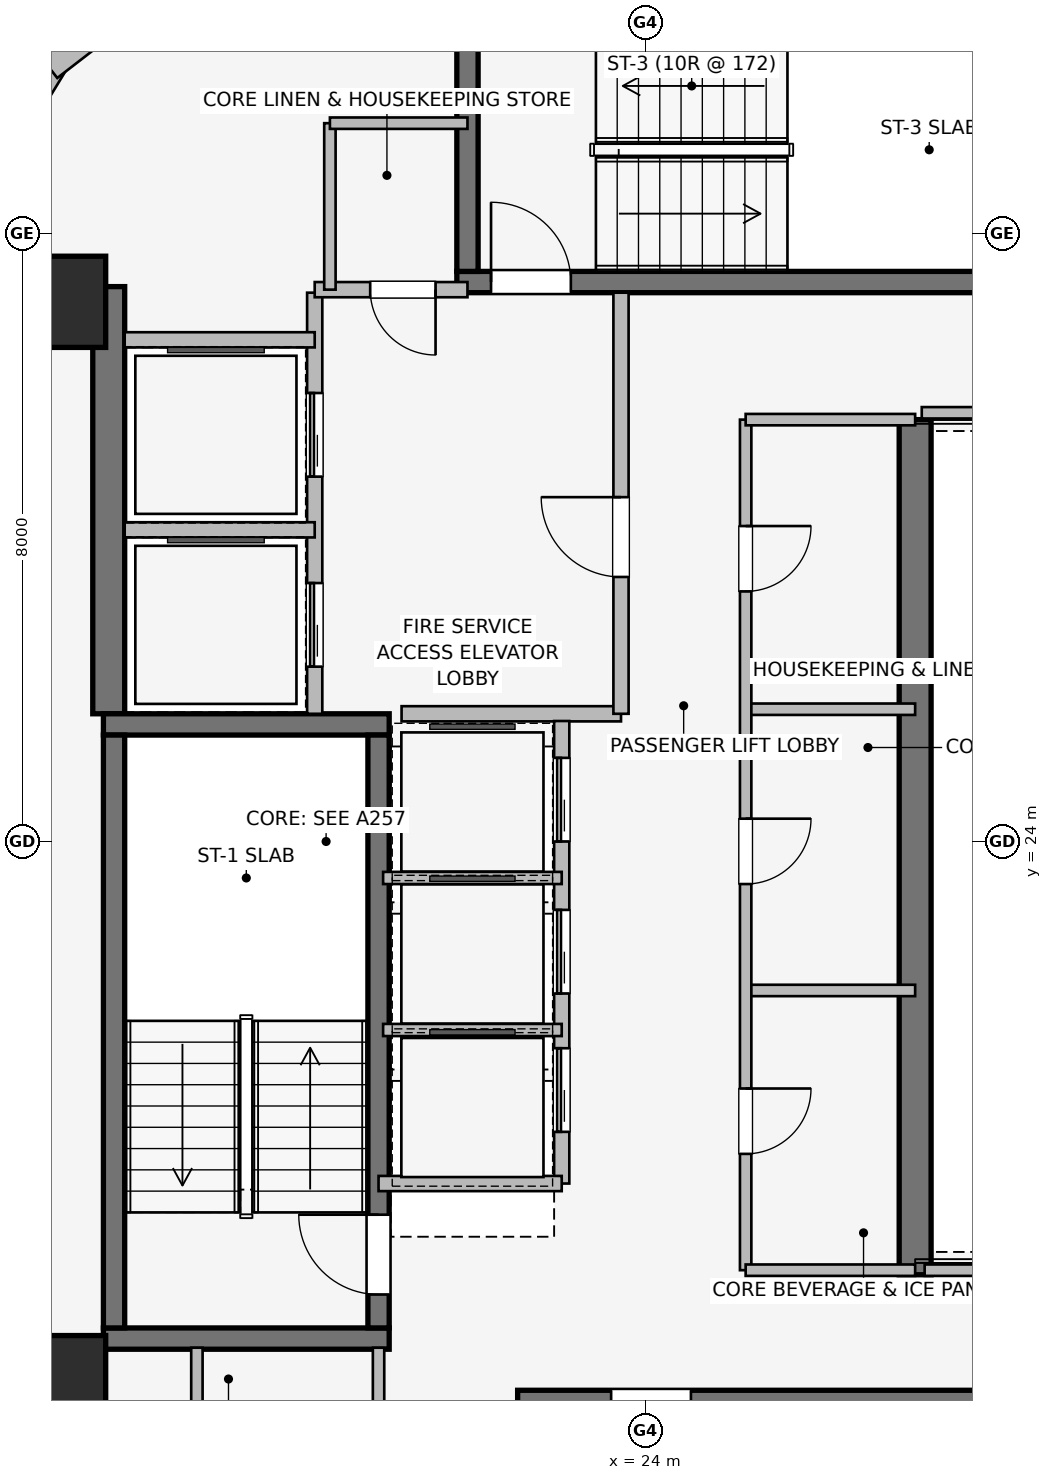
"""IFC4 building model, lengths in metres.
Left out: names, types, materials, properties, quantities, classifications, styles, units other than length and angle.
Written with IfcOpenShell. Run it as: python <this file> out.ifc"""

import sys

from ifc_helpers import new_model, si_unit, direction, frame, frame_2d, origin, origin_2d, place, context, subcontext, project, spatial, rectangle, extrude, element, fill, save


model = new_model("IFC4")
c1 = context("Model", 3, precision=1e-05, world=origin(), true_north=direction((0.0, 1.0)))
c2 = subcontext(c1, "Body", "Model", "MODEL_VIEW")
j1 = project(units=[si_unit("LENGTHUNIT", "METRE"), si_unit("PLANEANGLEUNIT", "RADIAN")], contexts=[c1])
p1 = place(None, origin())
s1 = spatial("IfcSite", under=j1, at=p1, CompositionType="ELEMENT")
p2 = place(p1, origin())
s2 = spatial("IfcBuilding", under=s1, at=p2, CompositionType="ELEMENT")
p3 = place(p2, frame((0.0, 0.0, 203.35)))
s3 = spatial("IfcBuildingStorey", under=s2, at=p3, CompositionType="ELEMENT", Elevation=203.35)
p4 = place(p3, frame((16.94, 25.68, 0.0), z_axis=(0.0, 0.0, 1.0), x_axis=(0.0, 1.0, 0.0)))
e1 = element("IfcWall", 1, at=p4, inside=s3, PredefinedType="SHEAR", context=c2, shape_type="SweptSolid", body=[
    extrude(rectangle(XDim=5.62, YDim=0.42, at=frame_2d((2.81, 0.0))), origin(), (0.0, 0.0, 1.0), 3.45),
])
p5 = place(p3, frame((27.55, 29.55, 0.0), z_axis=(0.0, 0.0, 1.0), x_axis=(0.0, -1.0, 0.0)))
e2 = element("IfcWall", 2, at=p5, inside=s3, PredefinedType="SHEAR", context=c2, shape_type="SweptSolid", body=[
    extrude(rectangle(XDim=11.25, YDim=0.42, at=frame_2d((5.625, 0.0))), origin(), (0.0, 0.0, 1.0), 3.45),
])
for number, where, z_axis, x_axis in (
    (3, (16.87, 17.46, 0.0), (0.0, 0.0, 1.0), (1.0, 0.0, 0.0)),
    (4, (20.63, 25.54, 0.0), (0.0, 0.0, 1.0), (-1.0, 0.0, 0.0)),
):
    element("IfcWall", number, at=place(p3, frame(where, z_axis=z_axis, x_axis=x_axis)), inside=s3, PredefinedType="SHEAR", context=c2, shape_type="SweptSolid", body=[
        extrude(rectangle(XDim=3.76, YDim=0.28, at=frame_2d((1.88, 0.0))), origin(), (0.0, 0.0, 1.0), 3.45),
    ])
p6 = place(p3, frame((17.01, 25.4, 0.0), z_axis=(0.0, 0.0, 1.0), x_axis=(0.0, -1.0, 0.0)))
e5 = element("IfcWall", 5, at=p6, inside=s3, PredefinedType="SHEAR", context=c2, shape_type="SweptSolid", body=[
    extrude(rectangle(XDim=7.8, YDim=0.28, at=frame_2d((3.9, 0.0))), origin(), (0.0, 0.0, 1.0), 3.45),
])
p7 = place(p3, frame((20.49, 17.6, 0.0), z_axis=(0.0, 0.0, 1.0), x_axis=(0.0, 1.0, 0.0)))
e6 = element("IfcWall", 6, at=p7, inside=s3, PredefinedType="SHEAR", context=c2, shape_type="SweptSolid", body=[
    extrude(rectangle(XDim=7.8, YDim=0.28, at=frame_2d((3.9, 0.0))), origin(), (0.0, 0.0, 1.0), 3.45),
])
p8 = place(p7, frame((0.44, 0.0, 0.0)))
e7 = element("IfcOpeningElement", 7, at=p8, cuts=e6, PredefinedType="OPENING", context=c2, shape_type="SweptSolid", body=[
    extrude(rectangle(XDim=1.05, YDim=2.0, at=frame_2d((0.525, 1.0))), frame((0.0, 0.15, 0.0), z_axis=(0.0, -1.0, 0.0), x_axis=(1.0, 0.0, 0.0)), (0.0, 0.0, 1.0), 0.3),
])
p9 = place(p3, frame((30.68, 16.64, 0.0), z_axis=(0.0, 0.0, 1.0), x_axis=(-1.0, 0.0, 0.0)))
e8 = element("IfcWall", 8, at=p9, inside=s3, PredefinedType="SHEAR", context=c2, shape_type="SweptSolid", body=[
    extrude(rectangle(XDim=8.36, YDim=0.28, at=frame_2d((4.18, 0.0))), origin(), (0.0, 0.0, 1.0), 3.45),
])
p10 = place(p9, frame((6.08, 0.0, 0.0)))
e9 = element("IfcOpeningElement", 9, at=p10, cuts=e8, PredefinedType="OPENING", context=c2, shape_type="SweptSolid", body=[
    extrude(rectangle(XDim=1.05, YDim=2.0, at=frame_2d((0.525, 1.0))), frame((0.0, 0.15, 0.0), z_axis=(0.0, -1.0, 0.0), x_axis=(1.0, 0.0, 0.0)), (0.0, 0.0, 1.0), 0.3),
])
p11 = place(p3, frame((21.52, 31.36, 0.0), z_axis=(0.0, 0.0, 1.0), x_axis=(1.0, 0.0, 0.0)))
e10 = element("IfcWall", 10, at=p11, inside=s3, PredefinedType="SHEAR", context=c2, shape_type="SweptSolid", body=[
    extrude(rectangle(XDim=8.36, YDim=0.28, at=frame_2d((4.18, 0.0))), origin(), (0.0, 0.0, 1.0), 3.45),
])
p12 = place(p11, frame((0.45, 0.0, 0.0)))
e11 = element("IfcOpeningElement", 11, at=p12, cuts=e10, PredefinedType="OPENING", context=c2, shape_type="SweptSolid", body=[
    extrude(rectangle(XDim=1.05, YDim=2.0, at=frame_2d((0.525, 1.0))), frame((0.0, 0.15, 0.0), z_axis=(0.0, -1.0, 0.0), x_axis=(1.0, 0.0, 0.0)), (0.0, 0.0, 1.0), 0.3),
])
p13 = place(p3, frame((21.66, 34.7, 0.0), z_axis=(0.0, 0.0, 1.0), x_axis=(0.0, -1.0, 0.0)))
e12 = element("IfcWall", 12, at=p13, inside=s3, PredefinedType="SHEAR", context=c2, shape_type="SweptSolid", body=[
    extrude(rectangle(XDim=3.2, YDim=0.28, at=frame_2d((1.6, 0.0))), origin(), (0.0, 0.0, 1.0), 3.45),
])
for number, where, z_axis, x_axis in (
    (13, (16.3, 16.9, 0.0), (0.0, 0.0, 1.0), (1.0, 0.0, 0.0)),
    (14, (16.3, 31.1, 0.0), (0.0, 0.0, 1.0), (1.0, 0.0, 0.0)),
):
    element("IfcColumn", number, at=place(p3, frame(where, z_axis=z_axis, x_axis=x_axis)), inside=s3, PredefinedType="COLUMN", context=c2, shape_type="SweptSolid", body=[
        extrude(rectangle(XDim=1.2, YDim=1.2, at=origin_2d()), origin(), (0.0, 0.0, 1.0), 3.45),
    ])
p14 = place(p3, frame((15.415, 32.882, 0.0), z_axis=(0.0, 0.0, 1.0), x_axis=(0.520325409202, 0.853968072318, 0.0)))
e15 = element("IfcWall", 15, at=p14, inside=s3, PredefinedType="STANDARD", context=c2, shape_type="SweptSolid", body=[
    extrude(rectangle(XDim=1.678, YDim=0.33, at=frame_2d((0.839, 0.0))), origin(), (0.0, 0.0, 1.0), 3.19),
])
p15 = place(p3, frame((16.162, 34.175, 0.0), z_axis=(0.0, 0.0, 1.0), x_axis=(0.791409877269, 0.611285862884, 0.0)))
e16 = element("IfcWall", 16, at=p15, inside=s3, PredefinedType="STANDARD", context=c2, shape_type="SweptSolid", body=[
    extrude(rectangle(XDim=1.677, YDim=0.33, at=frame_2d((0.838, 0.0))), origin(), (0.0, 0.0, 1.0), 3.19),
])
p16 = place(p3, frame((19.65, 25.68, 0.0), z_axis=(0.0, 0.0, 1.0), x_axis=(0.0, 1.0, 0.0)))
e17 = element("IfcWall", 17, at=p16, inside=s3, PredefinedType="PARTITIONING", context=c2, shape_type="SweptSolid", body=[
    extrude(rectangle(XDim=5.54, YDim=0.2, at=frame_2d((2.77, 0.0))), origin(), (0.0, 0.0, 1.0), 3.19),
])
p17 = place(p16, frame((0.62, 0.0, 0.0)))
e18 = element("IfcOpeningElement", 18, at=p17, cuts=e17, PredefinedType="OPENING", context=c2, shape_type="SweptSolid", body=[
    extrude(rectangle(XDim=1.1, YDim=2.2, at=frame_2d((0.55, 1.1))), frame((0.0, 0.11, 0.0), z_axis=(0.0, -1.0, 0.0), x_axis=(1.0, 0.0, 0.0)), (0.0, 0.0, 1.0), 0.22),
])
p18 = place(p16, frame((3.12, 0.0, 0.0)))
e19 = element("IfcOpeningElement", 19, at=p18, cuts=e17, PredefinedType="OPENING", context=c2, shape_type="SweptSolid", body=[
    extrude(rectangle(XDim=1.1, YDim=2.2, at=frame_2d((0.55, 1.1))), frame((0.0, 0.11, 0.0), z_axis=(0.0, -1.0, 0.0), x_axis=(1.0, 0.0, 0.0)), (0.0, 0.0, 1.0), 0.22),
])
p19 = place(p3, frame((20.793, 25.68, 0.0), z_axis=(0.0, 0.0, 1.0), x_axis=(1.0, 0.0, 0.0)))
e20 = element("IfcWall", 20, at=p19, inside=s3, PredefinedType="PARTITIONING", context=c2, shape_type="SweptSolid", body=[
    extrude(rectangle(XDim=2.887, YDim=0.2, at=frame_2d((1.443, 0.0))), origin(), (0.0, 0.0, 1.0), 3.19),
])
p20 = place(p3, frame((23.68, 25.68, 0.0), z_axis=(0.0, 0.0, 1.0), x_axis=(0.0, 1.0, 0.0)))
e21 = element("IfcWall", 21, at=p20, inside=s3, PredefinedType="PARTITIONING", context=c2, shape_type="SweptSolid", body=[
    extrude(rectangle(XDim=5.54, YDim=0.2, at=frame_2d((2.77, 0.0))), origin(), (0.0, 0.0, 1.0), 3.19),
])
p21 = place(p20, frame((1.8, 0.0, 0.0)))
e22 = element("IfcOpeningElement", 22, at=p21, cuts=e21, PredefinedType="OPENING", context=c2, shape_type="SweptSolid", body=[
    extrude(rectangle(XDim=1.05, YDim=2.0, at=frame_2d((0.525, 1.0))), frame((0.0, 0.11, 0.0), z_axis=(0.0, -1.0, 0.0), x_axis=(1.0, 0.0, 0.0)), (0.0, 0.0, 1.0), 0.22),
])
p22 = place(p3, frame((21.66, 31.26, 0.0), z_axis=(0.0, 0.0, 1.0), x_axis=(-1.0, 0.0, 0.0)))
e23 = element("IfcWall", 23, at=p22, inside=s3, PredefinedType="PARTITIONING", context=c2, shape_type="SweptSolid", body=[
    extrude(rectangle(XDim=2.01, YDim=0.2, at=frame_2d((1.005, 0.0))), origin(), (0.0, 0.0, 1.0), 3.19),
])
p23 = place(p22, frame((0.42, 0.0, 0.0)))
e24 = element("IfcOpeningElement", 24, at=p23, cuts=e23, PredefinedType="OPENING", context=c2, shape_type="SweptSolid", body=[
    extrude(rectangle(XDim=0.86, YDim=2.0, at=frame_2d((0.43, 1.0))), frame((0.0, 0.11, 0.0), z_axis=(0.0, -1.0, 0.0), x_axis=(1.0, 0.0, 0.0)), (0.0, 0.0, 1.0), 0.22),
])
p24 = place(p3, frame((17.15, 28.1, 0.0), z_axis=(0.0, 0.0, 1.0), x_axis=(1.0, 0.0, 0.0)))
e25 = element("IfcWall", 25, at=p24, inside=s3, PredefinedType="PARTITIONING", context=c2, shape_type="SweptSolid", body=[
    extrude(rectangle(XDim=2.5, YDim=0.2, at=frame_2d((1.25, 0.0))), origin(), (0.0, 0.0, 1.0), 3.19),
])
p25 = place(p3, frame((19.65, 30.6, 0.0), z_axis=(0.0, 0.0, 1.0), x_axis=(-1.0, 0.0, 0.0)))
e26 = element("IfcWall", 26, at=p25, inside=s3, PredefinedType="PARTITIONING", context=c2, shape_type="SweptSolid", body=[
    extrude(rectangle(XDim=2.5, YDim=0.2, at=frame_2d((1.25, 0.0))), origin(), (0.0, 0.0, 1.0), 2.09),
])
p26 = place(p3, frame((22.9, 19.5, 0.0), z_axis=(0.0, 0.0, 1.0), x_axis=(0.0, 1.0, 0.0)))
e27 = element("IfcWall", 27, at=p26, inside=s3, PredefinedType="PARTITIONING", context=c2, shape_type="SweptSolid", body=[
    extrude(rectangle(XDim=6.085, YDim=0.2, at=frame_2d((3.042, 0.0))), origin(), (0.0, 0.0, 1.0), 3.19),
])
p27 = place(p26, frame((0.68, 0.0, 0.0)))
e28 = element("IfcOpeningElement", 28, at=p27, cuts=e27, PredefinedType="OPENING", context=c2, shape_type="SweptSolid", body=[
    extrude(rectangle(XDim=1.1, YDim=2.2, at=frame_2d((0.55, 1.1))), frame((0.0, 0.11, 0.0), z_axis=(0.0, -1.0, 0.0), x_axis=(1.0, 0.0, 0.0)), (0.0, 0.0, 1.0), 0.22),
])
p28 = place(p26, frame((2.5, 0.0, 0.0)))
e29 = element("IfcOpeningElement", 29, at=p28, cuts=e27, PredefinedType="OPENING", context=c2, shape_type="SweptSolid", body=[
    extrude(rectangle(XDim=1.1, YDim=2.2, at=frame_2d((0.55, 1.1))), frame((0.0, 0.11, 0.0), z_axis=(0.0, -1.0, 0.0), x_axis=(1.0, 0.0, 0.0)), (0.0, 0.0, 1.0), 0.22),
])
p29 = place(p26, frame((4.5, 0.0, 0.0)))
e30 = element("IfcOpeningElement", 30, at=p29, cuts=e27, PredefinedType="OPENING", context=c2, shape_type="SweptSolid", body=[
    extrude(rectangle(XDim=1.1, YDim=2.2, at=frame_2d((0.55, 1.1))), frame((0.0, 0.11, 0.0), z_axis=(0.0, -1.0, 0.0), x_axis=(1.0, 0.0, 0.0)), (0.0, 0.0, 1.0), 0.22),
])
p30 = place(p3, frame((20.49, 19.5, 0.0), z_axis=(0.0, 0.0, 1.0), x_axis=(1.0, 0.0, 0.0)))
e31 = element("IfcWall", 31, at=p30, inside=s3, PredefinedType="PARTITIONING", context=c2, shape_type="SweptSolid", body=[
    extrude(rectangle(XDim=2.41, YDim=0.2, at=frame_2d((1.205, 0.0))), origin(), (0.0, 0.0, 1.0), 2.09),
])
for number, where, z_axis, x_axis in (
    (32, (20.55, 21.52, 0.0), (0.0, 0.0, 1.0), (1.0, 0.0, 0.0)),
    (33, (20.55, 23.52, 0.0), (0.0, 0.0, 1.0), (1.0, 0.0, 0.0)),
):
    element("IfcWall", number, at=place(p3, frame(where, z_axis=z_axis, x_axis=x_axis)), inside=s3, PredefinedType="PARTITIONING", context=c2, shape_type="SweptSolid", body=[
        extrude(rectangle(XDim=2.35, YDim=0.16, at=frame_2d((1.175, 0.0))), origin(), (0.0, 0.0, 1.0), 3.19),
    ])
for number, where, z_axis, x_axis in (
    (34, (25.32, 22.04, 0.0), (0.0, 0.0, 1.0), (1.0, 0.0, 0.0)),
    (35, (25.32, 25.74, 0.0), (0.0, 0.0, 1.0), (1.0, 0.0, 0.0)),
):
    element("IfcWall", number, at=place(p3, frame(where, z_axis=z_axis, x_axis=x_axis)), inside=s3, PredefinedType="PARTITIONING", context=c2, shape_type="SweptSolid", body=[
        extrude(rectangle(XDim=2.23, YDim=0.15, at=frame_2d((1.115, 0.0))), origin(), (0.0, 0.0, 1.0), 3.19),
    ])
p31 = place(p3, frame((25.32, 29.55, 0.0), z_axis=(0.0, 0.0, 1.0), x_axis=(0.0, -1.0, 0.0)))
e36 = element("IfcWall", 36, at=p31, inside=s3, PredefinedType="PARTITIONING", context=c2, shape_type="SweptSolid", body=[
    extrude(rectangle(XDim=11.19, YDim=0.15, at=frame_2d((5.595, 0.0))), origin(), (0.0, 0.0, 1.0), 3.19),
])
p32 = place(p31, frame((1.4, 0.0, 0.0)))
e37 = element("IfcOpeningElement", 37, at=p32, cuts=e36, PredefinedType="OPENING", context=c2, shape_type="SweptSolid", body=[
    extrude(rectangle(XDim=0.86, YDim=2.0, at=frame_2d((0.43, 1.0))), frame((0.0, 0.085, 0.0), z_axis=(0.0, -1.0, 0.0), x_axis=(1.0, 0.0, 0.0)), (0.0, 0.0, 1.0), 0.17),
])
p33 = place(p31, frame((5.25, 0.0, 0.0)))
e38 = element("IfcOpeningElement", 38, at=p33, cuts=e36, PredefinedType="OPENING", context=c2, shape_type="SweptSolid", body=[
    extrude(rectangle(XDim=0.86, YDim=2.0, at=frame_2d((0.43, 1.0))), frame((0.0, 0.085, 0.0), z_axis=(0.0, -1.0, 0.0), x_axis=(1.0, 0.0, 0.0)), (0.0, 0.0, 1.0), 0.17),
])
p34 = place(p31, frame((8.8, 0.0, 0.0)))
e39 = element("IfcOpeningElement", 39, at=p34, cuts=e36, PredefinedType="OPENING", context=c2, shape_type="SweptSolid", body=[
    extrude(rectangle(XDim=0.86, YDim=2.0, at=frame_2d((0.43, 1.0))), frame((0.0, 0.085, 0.0), z_axis=(0.0, -1.0, 0.0), x_axis=(1.0, 0.0, 0.0)), (0.0, 0.0, 1.0), 0.17),
])
p35 = place(p3, frame((25.32, 18.36, 0.0), z_axis=(0.0, 0.0, 1.0), x_axis=(1.0, 0.0, 0.0)))
e40 = element("IfcWall", 40, at=p35, inside=s3, PredefinedType="PARTITIONING", context=c2, shape_type="SweptSolid", body=[
    extrude(rectangle(XDim=2.23, YDim=0.15, at=frame_2d((1.115, 0.0))), origin(), (0.0, 0.0, 1.0), 3.19),
])
p36 = place(p3, frame((27.55, 29.55, 0.0), z_axis=(0.0, 0.0, 1.0), x_axis=(-1.0, 0.0, 0.0)))
e41 = element("IfcWall", 41, at=p36, inside=s3, PredefinedType="PARTITIONING", context=c2, shape_type="SweptSolid", body=[
    extrude(rectangle(XDim=2.23, YDim=0.15, at=frame_2d((1.115, 0.0))), origin(), (0.0, 0.0, 1.0), 2.09),
])
p37 = place(p3, frame((18.1, 17.34, 0.0), z_axis=(0.0, 0.0, 1.0), x_axis=(0.0, -1.0, 0.0)))
e42 = element("IfcWall", 42, at=p37, inside=s3, PredefinedType="PARTITIONING", context=c2, shape_type="SweptSolid", body=[
    extrude(rectangle(XDim=2.52, YDim=0.15, at=frame_2d((1.26, 0.0))), origin(), (0.0, 0.0, 1.0), 3.19),
])
p38 = place(p3, frame((20.49, 14.82, 0.0), z_axis=(0.0, 0.0, 1.0), x_axis=(0.0, 1.0, 0.0)))
e43 = element("IfcWall", 43, at=p38, inside=s3, PredefinedType="PARTITIONING", context=c2, shape_type="SweptSolid", body=[
    extrude(rectangle(XDim=2.52, YDim=0.15, at=frame_2d((1.26, 0.0))), origin(), (0.0, 0.0, 1.0), 3.19),
])
p39 = place(p38, frame((0.72, 0.0, 0.0)))
e44 = element("IfcOpeningElement", 44, at=p39, cuts=e43, PredefinedType="OPENING", context=c2, shape_type="SweptSolid", body=[
    extrude(rectangle(XDim=0.86, YDim=2.0, at=frame_2d((0.43, 1.0))), frame((0.0, 0.085, 0.0), z_axis=(0.0, -1.0, 0.0), x_axis=(1.0, 0.0, 0.0)), (0.0, 0.0, 1.0), 0.17),
])
p40 = place(p3, frame((19.85, 33.45, 0.0), z_axis=(0.0, 0.0, 1.0), x_axis=(0.0, -1.0, 0.0)))
e45 = element("IfcWall", 45, at=p40, inside=s3, PredefinedType="PARTITIONING", context=c2, shape_type="SweptSolid", body=[
    extrude(rectangle(XDim=2.19, YDim=0.15, at=frame_2d((1.095, 0.0))), origin(), (0.0, 0.0, 1.0), 3.19),
])
p41 = place(p3, frame((21.66, 33.45, 0.0), z_axis=(0.0, 0.0, 1.0), x_axis=(-1.0, 0.0, 0.0)))
e46 = element("IfcWall", 46, at=p41, inside=s3, PredefinedType="PARTITIONING", context=c2, shape_type="SweptSolid", body=[
    extrude(rectangle(XDim=1.81, YDim=0.15, at=frame_2d((0.905, 0.0))), origin(), (0.0, 0.0, 1.0), 3.19),
])
p42 = place(p3, frame((27.675, 18.36, 0.0), z_axis=(0.0, 0.0, 1.0), x_axis=(1.0, 0.0, 0.0)))
e47 = element("IfcWall", 47, at=p42, inside=s3, PredefinedType="PARTITIONING", context=c2, shape_type="SweptSolid", body=[
    extrude(rectangle(XDim=12.165, YDim=0.15, at=frame_2d((6.083, 0.0))), origin(), (0.0, 0.0, 1.0), 2.331),
])
p43 = place(p3, frame((39.84, 29.64, 0.0), z_axis=(0.0, 0.0, 1.0), x_axis=(-1.0, 0.0, 0.0)))
e48 = element("IfcWall", 48, at=p43, inside=s3, PredefinedType="PARTITIONING", context=c2, shape_type="SweptSolid", body=[
    extrude(rectangle(XDim=12.203, YDim=0.15, at=frame_2d((6.102, 0.0))), origin(), (0.0, 0.0, 1.0), 2.331),
])
p44 = place(p8, origin())
e49 = element("IfcDoor", 49, at=p44, inside=s3, OperationType="SINGLE_SWING_RIGHT", PredefinedType="DOOR", context=c2, shape_type="SweptSolid", body=[
    extrude(rectangle(XDim=1.05, YDim=2.0, at=frame_2d((0.525, 1.0))), frame((0.0, 0.025, 0.0), z_axis=(0.0, -1.0, 0.0), x_axis=(1.0, 0.0, 0.0)), (0.0, 0.0, 1.0), 0.05),
])
fill(e7, e49)
p45 = place(p10, origin())
e50 = element("IfcDoor", 50, at=p45, inside=s3, OperationType="SINGLE_SWING_RIGHT", PredefinedType="DOOR", context=c2, shape_type="SweptSolid", body=[
    extrude(rectangle(XDim=1.05, YDim=2.0, at=frame_2d((0.525, 1.0))), frame((0.0, 0.025, 0.0), z_axis=(0.0, -1.0, 0.0), x_axis=(1.0, 0.0, 0.0)), (0.0, 0.0, 1.0), 0.05),
])
fill(e9, e50)
p46 = place(p12, origin())
e51 = element("IfcDoor", 51, at=p46, inside=s3, OperationType="SINGLE_SWING_LEFT", PredefinedType="DOOR", context=c2, shape_type="SweptSolid", body=[
    extrude(rectangle(XDim=1.05, YDim=2.0, at=frame_2d((0.525, 1.0))), frame((0.0, 0.025, 0.0), z_axis=(0.0, -1.0, 0.0), x_axis=(1.0, 0.0, 0.0)), (0.0, 0.0, 1.0), 0.05),
])
fill(e11, e51)
p47 = place(p17, origin())
e52 = element("IfcDoor", 52, at=p47, inside=s3, OperationType="SLIDING_TO_LEFT", PredefinedType="DOOR", context=c2, shape_type="SweptSolid", body=[
    extrude(rectangle(XDim=1.1, YDim=2.2, at=frame_2d((0.55, 1.1))), frame((0.0, 0.025, 0.0), z_axis=(0.0, -1.0, 0.0), x_axis=(1.0, 0.0, 0.0)), (0.0, 0.0, 1.0), 0.05),
])
fill(e18, e52)
p48 = place(p18, origin())
e53 = element("IfcDoor", 53, at=p48, inside=s3, OperationType="SLIDING_TO_LEFT", PredefinedType="DOOR", context=c2, shape_type="SweptSolid", body=[
    extrude(rectangle(XDim=1.1, YDim=2.2, at=frame_2d((0.55, 1.1))), frame((0.0, 0.025, 0.0), z_axis=(0.0, -1.0, 0.0), x_axis=(1.0, 0.0, 0.0)), (0.0, 0.0, 1.0), 0.05),
])
fill(e19, e53)
p49 = place(p21, origin())
e54 = element("IfcDoor", 54, at=p49, inside=s3, OperationType="SINGLE_SWING_RIGHT", PredefinedType="DOOR", context=c2, shape_type="SweptSolid", body=[
    extrude(rectangle(XDim=1.05, YDim=2.0, at=frame_2d((0.525, 1.0))), frame((0.0, 0.025, 0.0), z_axis=(0.0, -1.0, 0.0), x_axis=(1.0, 0.0, 0.0)), (0.0, 0.0, 1.0), 0.05),
])
fill(e22, e54)
p50 = place(p23, origin())
e55 = element("IfcDoor", 55, at=p50, inside=s3, OperationType="SINGLE_SWING_LEFT", PredefinedType="DOOR", context=c2, shape_type="SweptSolid", body=[
    extrude(rectangle(XDim=0.86, YDim=2.0, at=frame_2d((0.43, 1.0))), frame((0.0, 0.025, 0.0), z_axis=(0.0, -1.0, 0.0), x_axis=(1.0, 0.0, 0.0)), (0.0, 0.0, 1.0), 0.05),
])
fill(e24, e55)
p51 = place(p27, origin())
e56 = element("IfcDoor", 56, at=p51, inside=s3, OperationType="SLIDING_TO_LEFT", PredefinedType="DOOR", context=c2, shape_type="SweptSolid", body=[
    extrude(rectangle(XDim=1.1, YDim=2.2, at=frame_2d((0.55, 1.1))), frame((0.0, 0.025, 0.0), z_axis=(0.0, -1.0, 0.0), x_axis=(1.0, 0.0, 0.0)), (0.0, 0.0, 1.0), 0.05),
])
fill(e28, e56)
p52 = place(p28, origin())
e57 = element("IfcDoor", 57, at=p52, inside=s3, OperationType="SLIDING_TO_LEFT", PredefinedType="DOOR", context=c2, shape_type="SweptSolid", body=[
    extrude(rectangle(XDim=1.1, YDim=2.2, at=frame_2d((0.55, 1.1))), frame((0.0, 0.025, 0.0), z_axis=(0.0, -1.0, 0.0), x_axis=(1.0, 0.0, 0.0)), (0.0, 0.0, 1.0), 0.05),
])
fill(e29, e57)
p53 = place(p29, origin())
e58 = element("IfcDoor", 58, at=p53, inside=s3, OperationType="SLIDING_TO_LEFT", PredefinedType="DOOR", context=c2, shape_type="SweptSolid", body=[
    extrude(rectangle(XDim=1.1, YDim=2.2, at=frame_2d((0.55, 1.1))), frame((0.0, 0.025, 0.0), z_axis=(0.0, -1.0, 0.0), x_axis=(1.0, 0.0, 0.0)), (0.0, 0.0, 1.0), 0.05),
])
fill(e30, e58)
p54 = place(p32, origin())
e59 = element("IfcDoor", 59, at=p54, inside=s3, OperationType="SINGLE_SWING_LEFT", PredefinedType="DOOR", context=c2, shape_type="SweptSolid", body=[
    extrude(rectangle(XDim=0.86, YDim=2.0, at=frame_2d((0.43, 1.0))), frame((0.0, 0.025, 0.0), z_axis=(0.0, -1.0, 0.0), x_axis=(1.0, 0.0, 0.0)), (0.0, 0.0, 1.0), 0.05),
])
fill(e37, e59)
p55 = place(p33, origin())
e60 = element("IfcDoor", 60, at=p55, inside=s3, OperationType="SINGLE_SWING_LEFT", PredefinedType="DOOR", context=c2, shape_type="SweptSolid", body=[
    extrude(rectangle(XDim=0.86, YDim=2.0, at=frame_2d((0.43, 1.0))), frame((0.0, 0.025, 0.0), z_axis=(0.0, -1.0, 0.0), x_axis=(1.0, 0.0, 0.0)), (0.0, 0.0, 1.0), 0.05),
])
fill(e38, e60)
p56 = place(p34, origin())
e61 = element("IfcDoor", 61, at=p56, inside=s3, OperationType="SINGLE_SWING_LEFT", PredefinedType="DOOR", context=c2, shape_type="SweptSolid", body=[
    extrude(rectangle(XDim=0.86, YDim=2.0, at=frame_2d((0.43, 1.0))), frame((0.0, 0.025, 0.0), z_axis=(0.0, -1.0, 0.0), x_axis=(1.0, 0.0, 0.0)), (0.0, 0.0, 1.0), 0.05),
])
fill(e39, e61)
save(model, sys.argv[1])
